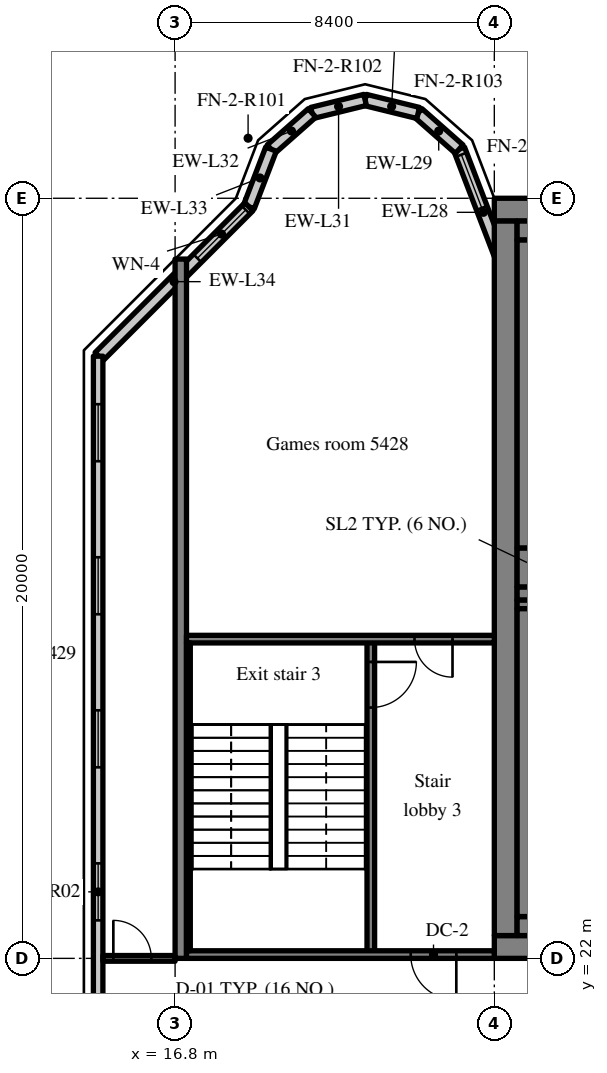
"""IFC4 building model, lengths in metres.
Left out: names, types, materials, properties, quantities, classifications, styles, units other than length and angle.
Written with IfcOpenShell. Run it as: python <this file> out.ifc"""

import sys

from ifc_helpers import new_model, si_unit, direction, frame, frame_2d, origin, place, context, subcontext, project, spatial, rectangle, extrude, source, transform, mapped, element, fill, save


model = new_model("IFC4")
c1 = context("Model", 3, precision=1e-05, world=origin(), true_north=direction((0.0, 1.0)))
c2 = subcontext(c1, "Body", "Model", "MODEL_VIEW")
j1 = project(units=[si_unit("LENGTHUNIT", "METRE"), si_unit("PLANEANGLEUNIT", "RADIAN")], contexts=[c1])
p1 = place(None, origin())
s1 = spatial("IfcSite", under=j1, at=p1, CompositionType="ELEMENT")
p2 = place(p1, origin())
s2 = spatial("IfcBuilding", under=s1, at=p2, CompositionType="ELEMENT")
p3 = place(p2, frame((0.0, 0.0, 225.7)))
s3 = spatial("IfcBuildingStorey", under=s2, at=p3, CompositionType="ELEMENT", Elevation=225.7)
m1 = source(origin(), c2, "Body", "SweptSolid", [
    extrude(rectangle(XDim=50.4, YDim=0.6, at=frame_2d((25.2, 0.0))), origin(), (0.0, 0.0, 1.0), 3.62),
])
p4 = place(p3, frame((25.2, 22.3, 0.0), z_axis=(0.0, 0.0, 1.0), x_axis=(1.0, 0.0, 0.0)))
e1 = element("IfcWall", 1, at=p4, inside=s3, PredefinedType="SHEAR", context=c2, shape_type="MappedRepresentation", body=[
    mapped(m1, transform((0.0, 0.0, 0.0), scale=1.0)),
])
m2 = source(origin(), c2, "Body", "SweptSolid", [
    extrude(rectangle(XDim=1.8, YDim=2.1, at=frame_2d((0.9, 1.05))), frame((0.0, 0.31, 0.0), z_axis=(0.0, -1.0, 0.0), x_axis=(1.0, 0.0, 0.0)), (0.0, 0.0, 1.0), 0.62),
])
p5 = place(p4, frame((15.9, 0.0, 0.0)))
e2 = element("IfcOpeningElement", 2, at=p5, cuts=e1, PredefinedType="OPENING", context=c2, shape_type="MappedRepresentation", body=[
    mapped(m2, transform((0.0, 0.0, 0.0), scale=1.0)),
])
m3 = source(origin(), c2, "Body", "SweptSolid", [
    extrude(rectangle(XDim=0.9, YDim=2.1, at=frame_2d((0.45, 1.05))), frame((0.0, 0.31, 0.0), z_axis=(0.0, -1.0, 0.0), x_axis=(1.0, 0.0, 0.0)), (0.0, 0.0, 1.0), 0.62),
])
p6 = place(p4, frame((11.187, 0.0, 0.0)))
e3 = element("IfcOpeningElement", 3, at=p6, cuts=e1, PredefinedType="OPENING", context=c2, shape_type="MappedRepresentation", body=[
    mapped(m3, transform((0.0, 0.0, 0.0), scale=1.0)),
])
p7 = place(p4, frame((21.513, 0.0, 0.0)))
e4 = element("IfcOpeningElement", 4, at=p7, cuts=e1, PredefinedType="OPENING", context=c2, shape_type="MappedRepresentation", body=[
    mapped(m3, transform((0.0, 0.0, 0.0), scale=1.0)),
])
p8 = place(p4, frame((32.7, 0.0, 0.0)))
e5 = element("IfcOpeningElement", 5, at=p8, cuts=e1, PredefinedType="OPENING", context=c2, shape_type="MappedRepresentation", body=[
    mapped(m2, transform((0.0, 0.0, 0.0), scale=1.0)),
])
m4 = source(origin(), c2, "Body", "SweptSolid", [
    extrude(rectangle(XDim=1.2, YDim=2.1, at=frame_2d((0.6, 1.05))), frame((0.0, 0.31, 0.0), z_axis=(0.0, -1.0, 0.0), x_axis=(1.0, 0.0, 0.0)), (0.0, 0.0, 1.0), 0.62),
])
p9 = place(p4, frame((6.488, 0.0, 0.0)))
e6 = element("IfcOpeningElement", 6, at=p9, cuts=e1, PredefinedType="OPENING", context=c2, shape_type="MappedRepresentation", body=[
    mapped(m4, transform((0.0, 0.0, 0.0), scale=1.0)),
])
p10 = place(p4, frame((47.925, 0.0, 0.0)))
e7 = element("IfcOpeningElement", 7, at=p10, cuts=e1, PredefinedType="OPENING", context=c2, shape_type="MappedRepresentation", body=[
    mapped(m4, transform((0.0, 0.0, 0.0), scale=1.0)),
])
p11 = place(p3, frame((25.2, 41.7, 0.0), z_axis=(0.0, 0.0, 1.0), x_axis=(1.0, 0.0, 0.0)))
e8 = element("IfcWall", 8, at=p11, inside=s3, PredefinedType="SHEAR", context=c2, shape_type="MappedRepresentation", body=[
    mapped(m1, transform((0.0, 0.0, 0.0), scale=1.0)),
])
m5 = source(origin(), c2, "Body", "SweptSolid", [
    extrude(rectangle(XDim=18.8, YDim=0.6, at=frame_2d((9.4, 0.0))), origin(), (0.0, 0.0, 1.0), 3.62),
])
p12 = place(p3, frame((25.5, 22.6, 0.0), z_axis=(0.0, 0.0, 1.0), x_axis=(0.0, 1.0, 0.0)))
e9 = element("IfcWall", 9, at=p12, inside=s3, PredefinedType="SHEAR", context=c2, shape_type="MappedRepresentation", body=[
    mapped(m5, transform((0.0, 0.0, 0.0), scale=1.0)),
])
m6 = source(origin(), c2, "Body", "SweptSolid", [
    extrude(rectangle(XDim=7.625, YDim=0.35, at=frame_2d((3.812, 0.0))), origin(), (0.0, 0.0, 1.0), 3.62),
])
p13 = place(p3, frame((25.8, 31.6, 0.0), z_axis=(0.0, 0.0, 1.0), x_axis=(1.0, 0.0, 0.0)))
e10 = element("IfcWall", 10, at=p13, inside=s3, PredefinedType="SHEAR", context=c2, shape_type="MappedRepresentation", body=[
    mapped(m6, transform((0.0, 0.0, 0.0), scale=1.0)),
])
m7 = source(origin(), c2, "Body", "SweptSolid", [
    extrude(rectangle(XDim=1.1, YDim=2.1, at=frame_2d((0.55, 1.05))), frame((0.0, 0.185, 0.0), z_axis=(0.0, -1.0, 0.0), x_axis=(1.0, 0.0, 0.0)), (0.0, 0.0, 1.0), 0.37),
])
p14 = place(p13, frame((5.938, 0.0, 0.0)))
e11 = element("IfcOpeningElement", 11, at=p14, cuts=e10, PredefinedType="OPENING", context=c2, shape_type="MappedRepresentation", body=[
    mapped(m7, transform((0.0, 0.0, 0.0), scale=1.0)),
])
m8 = source(origin(), c2, "Body", "SweptSolid", [
    extrude(rectangle(XDim=18.4, YDim=0.3, at=frame_2d((9.2, 0.0))), origin(), (0.0, 0.0, 1.0), 3.62),
])
p15 = place(p3, frame((16.95, 22.0, 0.0), z_axis=(0.0, 0.0, 1.0), x_axis=(0.0, 1.0, 0.0)))
e12 = element("IfcWall", 12, at=p15, inside=s3, PredefinedType="SHEAR", context=c2, shape_type="MappedRepresentation", body=[
    mapped(m8, transform((0.0, 0.0, 0.0), scale=1.0)),
])
m9 = source(origin(), c2, "Body", "SweptSolid", [
    extrude(rectangle(XDim=3.559, YDim=0.3, at=frame_2d((1.78, 0.0))), origin(), (0.0, 0.0, 1.0), 3.62),
])
p16 = place(p3, frame((25.55, 39.969, 0.0), z_axis=(0.0, 0.0, 1.0), x_axis=(-0.35779745313, 0.933799219604, 0.0)))
e13 = element("IfcWall", 13, at=p16, inside=s3, PredefinedType="SOLIDWALL", context=c2, shape_type="MappedRepresentation", body=[
    mapped(m9, transform((0.0, 0.0, 0.0), scale=1.0)),
])
m10 = source(origin(), c2, "Body", "SweptSolid", [
    extrude(rectangle(XDim=1.5, YDim=2.0, at=frame_2d((0.75, 1.0))), frame((0.0, 0.16, 0.0), z_axis=(0.0, -1.0, 0.0), x_axis=(1.0, 0.0, 0.0)), (0.0, 0.0, 1.0), 0.32),
])
p17 = place(p16, frame((1.903, 0.0, 0.9)))
e14 = element("IfcOpeningElement", 14, at=p17, cuts=e13, PredefinedType="OPENING", context=c2, shape_type="MappedRepresentation", body=[
    mapped(m10, transform((0.0, 0.0, 0.0), scale=1.0)),
])
m11 = source(origin(), c2, "Body", "SweptSolid", [
    extrude(rectangle(XDim=1.44, YDim=0.3, at=frame_2d((0.72, 0.0))), origin(), (0.0, 0.0, 1.0), 3.62),
])
p18 = place(p3, frame((24.277, 43.292, 0.0), z_axis=(0.0, 0.0, 1.0), x_axis=(-0.749649827867, 0.661834673902, 0.0)))
e15 = element("IfcWall", 15, at=p18, inside=s3, PredefinedType="SOLIDWALL", context=c2, shape_type="MappedRepresentation", body=[
    mapped(m11, transform((0.0, 0.0, 0.0), scale=1.0)),
])
m12 = source(origin(), c2, "Body", "SweptSolid", [
    extrude(rectangle(XDim=1.438, YDim=0.3, at=frame_2d((0.719, 0.0))), origin(), (0.0, 0.0, 1.0), 3.62),
])
p19 = place(p3, frame((23.197, 44.245, 0.0), z_axis=(0.0, 0.0, 1.0), x_axis=(-0.971152283879, 0.238460146601, 0.0)))
e16 = element("IfcWall", 16, at=p19, inside=s3, PredefinedType="SOLIDWALL", context=c2, shape_type="MappedRepresentation", body=[
    mapped(m12, transform((0.0, 0.0, 0.0), scale=1.0)),
])
m13 = source(origin(), c2, "Body", "SweptSolid", [
    extrude(rectangle(XDim=1.439, YDim=0.3, at=frame_2d((0.719, 0.0))), origin(), (0.0, 0.0, 1.0), 3.62),
])
p20 = place(p3, frame((21.8, 44.588, 0.0), z_axis=(0.0, 0.0, 1.0), x_axis=(-0.971161932466, -0.238420848351, 0.0)))
e17 = element("IfcWall", 17, at=p20, inside=s3, PredefinedType="SOLIDWALL", context=c2, shape_type="MappedRepresentation", body=[
    mapped(m13, transform((0.0, 0.0, 0.0), scale=1.0)),
])
m14 = source(origin(), c2, "Body", "SweptSolid", [
    extrude(rectangle(XDim=1.44, YDim=0.3, at=frame_2d((0.72, 0.0))), origin(), (0.0, 0.0, 1.0), 3.62),
])
p21 = place(p3, frame((20.403, 44.245, 0.0), z_axis=(0.0, 0.0, 1.0), x_axis=(-0.74957555648, -0.661918790432, 0.0)))
e18 = element("IfcWall", 18, at=p21, inside=s3, PredefinedType="SOLIDWALL", context=c2, shape_type="MappedRepresentation", body=[
    mapped(m14, transform((0.0, 0.0, 0.0), scale=1.0)),
])
m15 = source(origin(), c2, "Body", "SweptSolid", [
    extrude(rectangle(XDim=1.622, YDim=0.3, at=frame_2d((0.811, 0.0))), origin(), (0.0, 0.0, 1.0), 3.62),
])
p22 = place(p3, frame((19.323, 43.292, 0.0), z_axis=(0.0, 0.0, 1.0), x_axis=(-0.357778527068, -0.933806471154, 0.0)))
e19 = element("IfcWall", 19, at=p22, inside=s3, PredefinedType="SOLIDWALL", context=c2, shape_type="MappedRepresentation", body=[
    mapped(m15, transform((0.0, 0.0, 0.0), scale=1.0)),
])
m16 = source(origin(), c2, "Body", "SweptSolid", [
    extrude(rectangle(XDim=5.576, YDim=0.3, at=frame_2d((2.788, 0.0))), origin(), (0.0, 0.0, 1.0), 3.62),
])
p23 = place(p3, frame((18.743, 41.777, 0.0), z_axis=(0.0, 0.0, 1.0), x_axis=(-0.707106781187, -0.707106781187, 0.0)))
e20 = element("IfcWall", 20, at=p23, inside=s3, PredefinedType="SOLIDWALL", context=c2, shape_type="MappedRepresentation", body=[
    mapped(m16, transform((0.0, 0.0, 0.0), scale=1.0)),
])
m17 = source(origin(), c2, "Body", "SweptSolid", [
    extrude(rectangle(XDim=1.8, YDim=1.5, at=frame_2d((0.9, 0.75))), frame((0.0, 0.16, 0.0), z_axis=(0.0, -1.0, 0.0), x_axis=(1.0, 0.0, 0.0)), (0.0, 0.0, 1.0), 0.32),
])
p24 = place(p23, frame((0.118, 0.0, 0.9)))
e21 = element("IfcOpeningElement", 21, at=p24, cuts=e20, PredefinedType="OPENING", context=c2, shape_type="MappedRepresentation", body=[
    mapped(m17, transform((0.0, 0.0, 0.0), scale=1.0)),
])
m18 = source(origin(), c2, "Body", "SweptSolid", [
    extrude(rectangle(XDim=28.189, YDim=0.25, at=frame_2d((14.095, 0.0))), origin(), (0.0, 0.0, 1.0), 3.62),
])
p25 = place(p3, frame((14.775, 37.845, 0.0), z_axis=(0.0, 0.0, 1.0), x_axis=(0.0, -1.0, 0.0)))
e22 = element("IfcWall", 22, at=p25, inside=s3, PredefinedType="SOLIDWALL", context=c2, shape_type="MappedRepresentation", body=[
    mapped(m18, transform((0.0, 0.0, 0.0), scale=1.0)),
])
m19 = source(origin(), c2, "Body", "SweptSolid", [
    extrude(rectangle(XDim=1.5, YDim=1.5, at=frame_2d((0.75, 0.75))), frame((0.0, 0.135, 0.0), z_axis=(0.0, -1.0, 0.0), x_axis=(1.0, 0.0, 0.0)), (0.0, 0.0, 1.0), 0.27),
])
p26 = place(p25, frame((1.263, 0.0, 0.9)))
e23 = element("IfcOpeningElement", 23, at=p26, cuts=e22, PredefinedType="OPENING", context=c2, shape_type="MappedRepresentation", body=[
    mapped(m19, transform((0.0, 0.0, 0.0), scale=1.0)),
])
p27 = place(p25, frame((5.291, 0.0, 0.9)))
e24 = element("IfcOpeningElement", 24, at=p27, cuts=e22, PredefinedType="OPENING", context=c2, shape_type="MappedRepresentation", body=[
    mapped(m19, transform((0.0, 0.0, 0.0), scale=1.0)),
])
p28 = place(p25, frame((9.318, 0.0, 0.9)))
e25 = element("IfcOpeningElement", 25, at=p28, cuts=e22, PredefinedType="OPENING", context=c2, shape_type="MappedRepresentation", body=[
    mapped(m19, transform((0.0, 0.0, 0.0), scale=1.0)),
])
p29 = place(p25, frame((13.345, 0.0, 0.9)))
e26 = element("IfcOpeningElement", 26, at=p29, cuts=e22, PredefinedType="OPENING", context=c2, shape_type="MappedRepresentation", body=[
    mapped(m19, transform((0.0, 0.0, 0.0), scale=1.0)),
])
p30 = place(p25, frame((17.372, 0.0, 0.9)))
e27 = element("IfcOpeningElement", 27, at=p30, cuts=e22, PredefinedType="OPENING", context=c2, shape_type="MappedRepresentation", body=[
    mapped(m19, transform((0.0, 0.0, 0.0), scale=1.0)),
])
p31 = place(p25, frame((21.399, 0.0, 0.9)))
e28 = element("IfcOpeningElement", 28, at=p31, cuts=e22, PredefinedType="OPENING", context=c2, shape_type="MappedRepresentation", body=[
    mapped(m19, transform((0.0, 0.0, 0.0), scale=1.0)),
])
p32 = place(p25, frame((25.426, 0.0, 0.9)))
e29 = element("IfcOpeningElement", 29, at=p32, cuts=e22, PredefinedType="OPENING", context=c2, shape_type="MappedRepresentation", body=[
    mapped(m19, transform((0.0, 0.0, 0.0), scale=1.0)),
])
m20 = source(origin(), c2, "Body", "SweptSolid", [
    extrude(rectangle(XDim=8.3, YDim=0.2, at=frame_2d((4.15, 0.0))), origin(), (0.0, 0.0, 1.0), 3.62),
])
p33 = place(p3, frame((21.95, 22.1, 0.0), z_axis=(0.0, 0.0, 1.0), x_axis=(0.0, 1.0, 0.0)))
e30 = element("IfcWall", 30, at=p33, inside=s3, PredefinedType="SOLIDWALL", context=c2, shape_type="MappedRepresentation", body=[
    mapped(m20, transform((0.0, 0.0, 0.0), scale=1.0)),
])
m21 = source(origin(), c2, "Body", "SweptSolid", [
    extrude(rectangle(XDim=1.2, YDim=2.1, at=frame_2d((0.6, 1.05))), frame((0.0, 0.11, 0.0), z_axis=(0.0, -1.0, 0.0), x_axis=(1.0, 0.0, 0.0)), (0.0, 0.0, 1.0), 0.22),
])
p34 = place(p33, frame((6.5, 0.0, 0.0)))
e31 = element("IfcOpeningElement", 31, at=p34, cuts=e30, PredefinedType="OPENING", context=c2, shape_type="MappedRepresentation", body=[
    mapped(m21, transform((0.0, 0.0, 0.0), scale=1.0)),
])
m22 = source(origin(), c2, "Body", "SweptSolid", [
    extrude(rectangle(XDim=8.1, YDim=0.2, at=frame_2d((4.05, 0.0))), origin(), (0.0, 0.0, 1.0), 3.62),
])
p35 = place(p3, frame((17.1, 22.1, 0.0), z_axis=(0.0, 0.0, 1.0), x_axis=(1.0, 0.0, 0.0)))
e32 = element("IfcWall", 32, at=p35, inside=s3, PredefinedType="SOLIDWALL", context=c2, shape_type="MappedRepresentation", body=[
    mapped(m22, transform((0.0, 0.0, 0.0), scale=1.0)),
])
p36 = place(p35, frame((5.9, 0.0, 0.0)))
e33 = element("IfcOpeningElement", 33, at=p36, cuts=e32, PredefinedType="OPENING", context=c2, shape_type="MappedRepresentation", body=[
    mapped(m21, transform((0.0, 0.0, 0.0), scale=1.0)),
])
p37 = place(p3, frame((17.1, 30.4, 0.0), z_axis=(0.0, 0.0, 1.0), x_axis=(1.0, 0.0, 0.0)))
e34 = element("IfcWall", 34, at=p37, inside=s3, PredefinedType="SOLIDWALL", context=c2, shape_type="MappedRepresentation", body=[
    mapped(m22, transform((0.0, 0.0, 0.0), scale=1.0)),
])
m23 = source(origin(), c2, "Body", "SweptSolid", [
    extrude(rectangle(XDim=1.0, YDim=2.1, at=frame_2d((0.5, 1.05))), frame((0.0, 0.11, 0.0), z_axis=(0.0, -1.0, 0.0), x_axis=(1.0, 0.0, 0.0)), (0.0, 0.0, 1.0), 0.22),
])
p38 = place(p37, frame((6.0, 0.0, 0.0)))
e35 = element("IfcOpeningElement", 35, at=p38, cuts=e34, PredefinedType="OPENING", context=c2, shape_type="MappedRepresentation", body=[
    mapped(m23, transform((0.0, 0.0, 0.0), scale=1.0)),
])
m24 = source(origin(), c2, "Body", "SweptSolid", [
    extrude(rectangle(XDim=5.15, YDim=0.5, at=frame_2d((2.575, 0.0))), origin(), (0.0, 0.0, 1.0), 3.62),
])
p39 = place(p3, frame((25.8, 22.85, 0.0), z_axis=(0.0, 0.0, 1.0), x_axis=(1.0, 0.0, 0.0)))
e36 = element("IfcWall", 36, at=p39, inside=s3, PredefinedType="SOLIDWALL", context=c2, shape_type="MappedRepresentation", body=[
    mapped(m24, transform((0.0, 0.0, 0.0), scale=1.0)),
])
m25 = source(origin(), c2, "Body", "SweptSolid", [
    extrude(rectangle(XDim=5.15, YDim=0.225, at=frame_2d((2.575, 0.0))), origin(), (0.0, 0.0, 1.0), 3.62),
])
p40 = place(p3, frame((25.8, 31.312, 0.0), z_axis=(0.0, 0.0, 1.0), x_axis=(1.0, 0.0, 0.0)))
e37 = element("IfcWall", 37, at=p40, inside=s3, PredefinedType="SOLIDWALL", context=c2, shape_type="MappedRepresentation", body=[
    mapped(m25, transform((0.0, 0.0, 0.0), scale=1.0)),
])
m26 = source(origin(), c2, "Body", "SweptSolid", [
    extrude(rectangle(XDim=8.1, YDim=0.5, at=frame_2d((4.05, 0.0))), origin(), (0.0, 0.0, 1.0), 3.62),
])
p41 = place(p3, frame((26.05, 23.1, 0.0), z_axis=(0.0, 0.0, 1.0), x_axis=(0.0, 1.0, 0.0)))
e38 = element("IfcWall", 38, at=p41, inside=s3, PredefinedType="SOLIDWALL", context=c2, shape_type="MappedRepresentation", body=[
    mapped(m26, transform((0.0, 0.0, 0.0), scale=1.0)),
])
m27 = source(origin(), c2, "Body", "SweptSolid", [
    extrude(rectangle(XDim=8.1, YDim=0.1, at=frame_2d((4.05, 0.0))), origin(), (0.0, 0.0, 1.0), 3.62),
])
p42 = place(p3, frame((17.15, 22.2, 0.0), z_axis=(0.0, 0.0, 1.0), x_axis=(0.0, 1.0, 0.0)))
e39 = element("IfcWall", 39, at=p42, inside=s3, PredefinedType="SOLIDWALL", context=c2, shape_type="MappedRepresentation", body=[
    mapped(m27, transform((0.0, 0.0, 0.0), scale=1.0)),
])
p43 = place(p3, frame((25.8, 41.15, 0.0), z_axis=(0.0, 0.0, 1.0), x_axis=(1.0, 0.0, 0.0)))
e40 = element("IfcWall", 40, at=p43, inside=s3, PredefinedType="SOLIDWALL", context=c2, shape_type="MappedRepresentation", body=[
    mapped(m24, transform((0.0, 0.0, 0.0), scale=1.0)),
])
m28 = source(origin(), c2, "Body", "SweptSolid", [
    extrude(rectangle(XDim=5.15, YDim=1.025, at=frame_2d((2.575, 0.0))), origin(), (0.0, 0.0, 1.0), 3.62),
])
p44 = place(p3, frame((25.8, 32.287, 0.0), z_axis=(0.0, 0.0, 1.0), x_axis=(1.0, 0.0, 0.0)))
e41 = element("IfcWall", 41, at=p44, inside=s3, PredefinedType="SOLIDWALL", context=c2, shape_type="MappedRepresentation", body=[
    mapped(m28, transform((0.0, 0.0, 0.0), scale=1.0)),
])
p45 = place(p3, frame((26.05, 32.8, 0.0), z_axis=(0.0, 0.0, 1.0), x_axis=(0.0, 1.0, 0.0)))
e42 = element("IfcWall", 42, at=p45, inside=s3, PredefinedType="SOLIDWALL", context=c2, shape_type="MappedRepresentation", body=[
    mapped(m26, transform((0.0, 0.0, 0.0), scale=1.0)),
])
m29 = source(origin(), c2, "Body", "SweptSolid", [
    extrude(rectangle(XDim=1.9, YDim=0.15, at=frame_2d((0.95, 0.0))), origin(), (0.0, 0.0, 1.0), 2.92),
])
p46 = place(p3, frame((14.9, 22.0, 0.0), z_axis=(0.0, 0.0, 1.0), x_axis=(1.0, 0.0, 0.0)))
e43 = element("IfcWall", 43, at=p46, inside=s3, PredefinedType="PARTITIONING", context=c2, shape_type="MappedRepresentation", body=[
    mapped(m29, transform((0.0, 0.0, 0.0), scale=1.0)),
])
m30 = source(origin(), c2, "Body", "SweptSolid", [
    extrude(rectangle(XDim=1.0, YDim=2.1, at=frame_2d((0.5, 1.05))), frame((0.0, 0.085, 0.0), z_axis=(0.0, -1.0, 0.0), x_axis=(1.0, 0.0, 0.0)), (0.0, 0.0, 1.0), 0.17),
])
p47 = place(p46, frame((0.275, 0.0, 0.0)))
e44 = element("IfcOpeningElement", 44, at=p47, cuts=e43, PredefinedType="OPENING", context=c2, shape_type="MappedRepresentation", body=[
    mapped(m30, transform((0.0, 0.0, 0.0), scale=1.0)),
])
m31 = source(origin(), c2, "Body", "SweptSolid", [
    extrude(rectangle(XDim=1.5, YDim=2.0, at=frame_2d((0.75, 1.0))), frame((0.0, 0.03, 0.0), z_axis=(0.0, -1.0, 0.0), x_axis=(1.0, 0.0, 0.0)), (0.0, 0.0, 1.0), 0.06),
])
p48 = place(p17, origin())
e45 = element("IfcWindow", 45, at=p48, inside=s3, PartitioningType="SINGLE_PANEL", PredefinedType="WINDOW", context=c2, shape_type="MappedRepresentation", body=[
    mapped(m31, transform((0.0, 0.0, 0.0), scale=1.0)),
])
fill(e14, e45)
m32 = source(origin(), c2, "Body", "SweptSolid", [
    extrude(rectangle(XDim=1.8, YDim=1.5, at=frame_2d((0.9, 0.75))), frame((0.0, 0.03, 0.0), z_axis=(0.0, -1.0, 0.0), x_axis=(1.0, 0.0, 0.0)), (0.0, 0.0, 1.0), 0.06),
])
p49 = place(p24, origin())
e46 = element("IfcWindow", 46, at=p49, inside=s3, PartitioningType="SINGLE_PANEL", PredefinedType="WINDOW", context=c2, shape_type="MappedRepresentation", body=[
    mapped(m32, transform((0.0, 0.0, 0.0), scale=1.0)),
])
fill(e21, e46)
m33 = source(origin(), c2, "Body", "SweptSolid", [
    extrude(rectangle(XDim=1.5, YDim=1.5, at=frame_2d((0.75, 0.75))), frame((0.0, 0.03, 0.0), z_axis=(0.0, -1.0, 0.0), x_axis=(1.0, 0.0, 0.0)), (0.0, 0.0, 1.0), 0.06),
])
p50 = place(p26, origin())
e47 = element("IfcWindow", 47, at=p50, inside=s3, PartitioningType="SINGLE_PANEL", PredefinedType="WINDOW", context=c2, shape_type="MappedRepresentation", body=[
    mapped(m33, transform((0.0, 0.0, 0.0), scale=1.0)),
])
fill(e23, e47)
p51 = place(p27, origin())
e48 = element("IfcWindow", 48, at=p51, inside=s3, PartitioningType="SINGLE_PANEL", PredefinedType="WINDOW", context=c2, shape_type="MappedRepresentation", body=[
    mapped(m33, transform((0.0, 0.0, 0.0), scale=1.0)),
])
fill(e24, e48)
p52 = place(p28, origin())
e49 = element("IfcWindow", 49, at=p52, inside=s3, PartitioningType="SINGLE_PANEL", PredefinedType="WINDOW", context=c2, shape_type="MappedRepresentation", body=[
    mapped(m33, transform((0.0, 0.0, 0.0), scale=1.0)),
])
fill(e25, e49)
p53 = place(p29, origin())
e50 = element("IfcWindow", 50, at=p53, inside=s3, PartitioningType="SINGLE_PANEL", PredefinedType="WINDOW", context=c2, shape_type="MappedRepresentation", body=[
    mapped(m33, transform((0.0, 0.0, 0.0), scale=1.0)),
])
fill(e26, e50)
m34 = source(origin(), c2, "Body", "SweptSolid", [
    extrude(rectangle(XDim=1.2, YDim=2.1, at=frame_2d((0.6, 1.05))), frame((0.0, 0.025, 0.0), z_axis=(0.0, -1.0, 0.0), x_axis=(1.0, 0.0, 0.0)), (0.0, 0.0, 1.0), 0.05),
])
p54 = place(p34, origin())
e51 = element("IfcDoor", 51, at=p54, inside=s3, OperationType="SINGLE_SWING_RIGHT", PredefinedType="DOOR", context=c2, shape_type="MappedRepresentation", body=[
    mapped(m34, transform((0.0, 0.0, 0.0), scale=1.0)),
])
fill(e31, e51)
p55 = place(p36, origin())
e52 = element("IfcDoor", 52, at=p55, inside=s3, OperationType="SINGLE_SWING_RIGHT", PredefinedType="DOOR", context=c2, shape_type="MappedRepresentation", body=[
    mapped(m34, transform((0.0, 0.0, 0.0), scale=1.0)),
])
fill(e33, e52)
m35 = source(origin(), c2, "Body", "SweptSolid", [
    extrude(rectangle(XDim=1.0, YDim=2.1, at=frame_2d((0.5, 1.05))), frame((0.0, 0.025, 0.0), z_axis=(0.0, -1.0, 0.0), x_axis=(1.0, 0.0, 0.0)), (0.0, 0.0, 1.0), 0.05),
])
p56 = place(p38, origin())
e53 = element("IfcDoor", 53, at=p56, inside=s3, OperationType="SINGLE_SWING_RIGHT", PredefinedType="DOOR", context=c2, shape_type="MappedRepresentation", body=[
    mapped(m35, transform((0.0, 0.0, 0.0), scale=1.0)),
])
fill(e35, e53)
p57 = place(p47, origin())
e54 = element("IfcDoor", 54, at=p57, inside=s3, OperationType="SINGLE_SWING_LEFT", PredefinedType="DOOR", context=c2, shape_type="MappedRepresentation", body=[
    mapped(m35, transform((0.0, 0.0, 0.0), scale=1.0)),
])
fill(e44, e54)
save(model, sys.argv[1])
